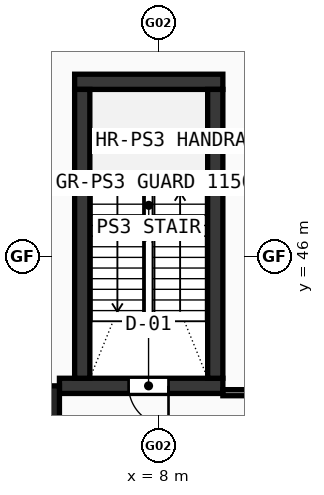
"""IFC4 building model, lengths in metres.
Left out: names, types, materials, properties, quantities, classifications, styles, units other than length and angle.
Written with IfcOpenShell. Run it as: python <this file> out.ifc"""

import sys

from ifc_helpers import new_model, si_unit, direction, frame, frame_2d, origin, origin_2d, place, context, subcontext, project, spatial, rectangle, hollow_rectangle, extrude, source, transform, mapped, element, fill, save


model = new_model("IFC4")
c1 = context("Model", 3, precision=1e-05, world=origin(), true_north=direction((0.0, 1.0)))
c2 = subcontext(c1, "Body", "Model", "MODEL_VIEW")
j1 = project(units=[si_unit("LENGTHUNIT", "METRE"), si_unit("PLANEANGLEUNIT", "RADIAN")], contexts=[c1])
p1 = place(None, origin())
s1 = spatial("IfcSite", under=j1, at=p1, CompositionType="ELEMENT")
p2 = place(p1, origin())
s2 = spatial("IfcBuilding", under=s1, at=p2, CompositionType="ELEMENT")
p3 = place(p2, frame((0.0, 0.0, -4.8)))
s3 = spatial("IfcBuildingStorey", under=s2, at=p3, CompositionType="ELEMENT", Elevation=-4.8)
p4 = place(p3, frame((5.8, 50.6, 0.0), z_axis=(0.0, 0.0, 1.0), x_axis=(1.0, 0.0, 0.0)))
e1 = element("IfcWall", 1, at=p4, inside=s3, PredefinedType="SHEAR", context=c2, shape_type="SweptSolid", body=[
    extrude(rectangle(XDim=3.9, YDim=0.4, at=frame_2d((1.95, 0.0))), origin(), (0.0, 0.0, 1.0), 4.52),
])
p5 = place(p3, frame((5.4, 42.6, 0.0), z_axis=(0.0, 0.0, 1.0), x_axis=(1.0, 0.0, 0.0)))
e2 = element("IfcWall", 2, at=p5, inside=s3, PredefinedType="SHEAR", context=c2, shape_type="SweptSolid", body=[
    extrude(rectangle(XDim=4.3, YDim=0.4, at=frame_2d((2.15, 0.0))), origin(), (0.0, 0.0, 1.0), 4.52),
])
p6 = place(p5, frame((1.82, 0.0, 0.0)))
e3 = element("IfcOpeningElement", 3, at=p6, cuts=e2, PredefinedType="OPENING", context=c2, shape_type="SweptSolid", body=[
    extrude(rectangle(XDim=1.05, YDim=2.1, at=frame_2d((0.525, 1.05))), frame((0.0, 0.21, 0.0), z_axis=(0.0, -1.0, 0.0), x_axis=(1.0, 0.0, 0.0)), (0.0, 0.0, 1.0), 0.42),
])
for number, where, z_axis, x_axis in (
    (4, (6.0, 42.8, 0.0), (0.0, 0.0, 1.0), (0.0, 1.0, 0.0)),
    (5, (9.5, 42.8, 0.0), (0.0, 0.0, 1.0), (0.0, 1.0, 0.0)),
):
    element("IfcWall", number, at=place(p3, frame(where, z_axis=z_axis, x_axis=x_axis)), inside=s3, PredefinedType="SHEAR", context=c2, shape_type="SweptSolid", body=[
        extrude(rectangle(XDim=7.6, YDim=0.4, at=frame_2d((3.8, 0.0))), origin(), (0.0, 0.0, 1.0), 4.52),
    ])
m1 = source(origin(), c2, "Body", "SweptSolid", [
    extrude(hollow_rectangle(XDim=1.2, YDim=1.2, WallThickness=0.05, at=origin_2d()), origin(), (0.0, 0.0, 1.0), 4.82),
])
p7 = place(p3, frame((4.8, 42.0, -0.3), z_axis=(0.0, 0.0, 1.0), x_axis=(1.0, 0.0, 0.0)))
e6 = element("IfcColumn", 6, at=p7, inside=s3, PredefinedType="COLUMN", context=c2, shape_type="MappedRepresentation", body=[
    mapped(m1, transform((0.0, 0.0, 0.0), scale=1.0)),
])
p8 = place(p3, frame((9.7, 42.42, 0.0), z_axis=(0.0, 0.0, 1.0), x_axis=(1.0, 0.0, 0.0)))
e7 = element("IfcWall", 7, at=p8, inside=s3, PredefinedType="PARTITIONING", context=c2, shape_type="SweptSolid", body=[
    extrude(rectangle(XDim=76.6, YDim=0.16, at=frame_2d((38.3, 0.0))), origin(), (0.0, 0.0, 1.0), 3.62),
])
p9 = place(p8, frame((26.8, 0.0, 0.0)))
e8 = element("IfcOpeningElement", 8, at=p9, cuts=e7, PredefinedType="OPENING", context=c2, shape_type="SweptSolid", body=[
    extrude(rectangle(XDim=1.05, YDim=2.1, at=frame_2d((0.525, 1.05))), frame((0.0, 0.09, 0.0), z_axis=(0.0, -1.0, 0.0), x_axis=(1.0, 0.0, 0.0)), (0.0, 0.0, 1.0), 0.18),
])
p10 = place(p8, frame((46.3, 0.0, 0.0)))
e9 = element("IfcOpeningElement", 9, at=p10, cuts=e7, PredefinedType="OPENING", context=c2, shape_type="SweptSolid", body=[
    extrude(rectangle(XDim=1.05, YDim=2.1, at=frame_2d((0.525, 1.05))), frame((0.0, 0.09, 0.0), z_axis=(0.0, -1.0, 0.0), x_axis=(1.0, 0.0, 0.0)), (0.0, 0.0, 1.0), 0.18),
])
m2 = source(origin(), c2, "Body", "SweptSolid", [
    extrude(rectangle(XDim=1.05, YDim=2.1, at=frame_2d((0.525, 1.05))), frame((0.0, 0.025, 0.0), z_axis=(0.0, -1.0, 0.0), x_axis=(1.0, 0.0, 0.0)), (0.0, 0.0, 1.0), 0.05),
])
p11 = place(p6, frame((1.05, 0.0, 0.0), z_axis=(0.0, 0.0, 1.0), x_axis=(-1.0, 0.0, 0.0)))
e10 = element("IfcDoor", 10, at=p11, inside=s3, OperationType="SINGLE_SWING_LEFT", PredefinedType="DOOR", context=c2, shape_type="MappedRepresentation", body=[
    mapped(m2, transform((0.0, 0.0, 0.0), scale=1.0)),
])
fill(e3, e10)
save(model, sys.argv[1])
